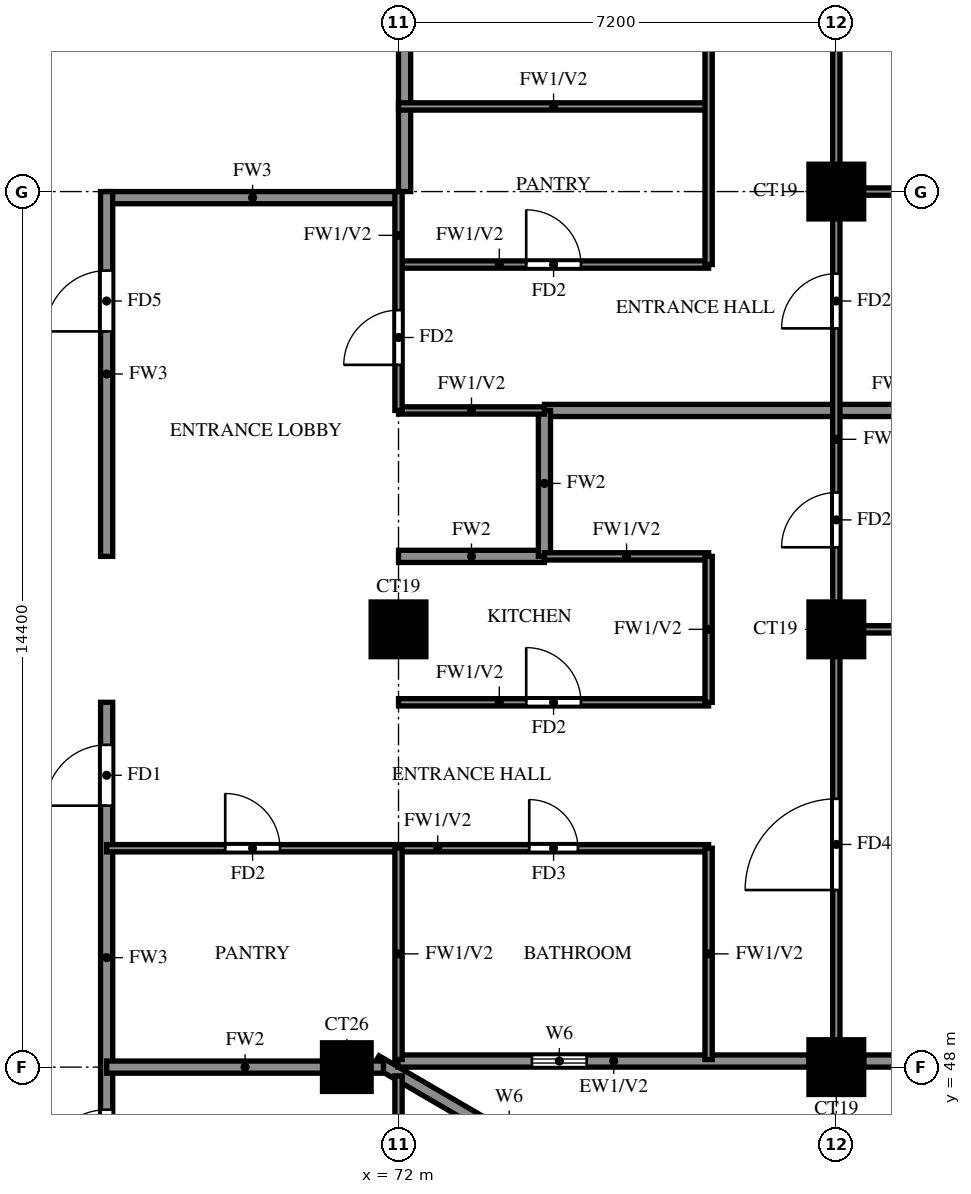
"""IFC4 building model, lengths in metres.
Left out: names, types, materials, properties, quantities, classifications, styles, units other than length and angle.
Written with IfcOpenShell. Run it as: python <this file> out.ifc"""

import sys

from ifc_helpers import new_model, si_unit, direction, frame, frame_2d, origin, origin_2d, place, context, subcontext, project, spatial, rectangle, extrude, source, transform, mapped, element, fill, save


model = new_model("IFC4")
c1 = context("Model", 3, precision=1e-05, world=origin(), true_north=direction((0.0, 1.0)))
c2 = subcontext(c1, "Body", "Model", "MODEL_VIEW")
j1 = project(units=[si_unit("LENGTHUNIT", "METRE"), si_unit("PLANEANGLEUNIT", "RADIAN")], contexts=[c1])
p1 = place(None, origin())
s1 = spatial("IfcSite", under=j1, at=p1, CompositionType="ELEMENT")
p2 = place(p1, origin())
s2 = spatial("IfcBuilding", under=s1, at=p2, CompositionType="ELEMENT")
p3 = place(p2, frame((0.0, 0.0, 174.5)))
s3 = spatial("IfcBuildingStorey", under=s2, at=p3, CompositionType="ELEMENT", Elevation=174.5)
m1 = source(origin(), c2, "Body", "SweptSolid", [
    extrude(rectangle(XDim=0.8, YDim=0.8, at=origin_2d()), origin(), (0.0, 0.0, 1.0), 3.2),
])
p4 = place(p3, frame((71.15, 48.0, 0.0), z_axis=(0.0, 0.0, 1.0), x_axis=(1.0, 0.0, 0.0)))
e1 = element("IfcColumn", 1, at=p4, inside=s3, PredefinedType="COLUMN", context=c2, shape_type="MappedRepresentation", body=[
    mapped(m1, transform((0.0, 0.0, 0.0))),
])
m2 = source(origin(), c2, "Body", "SweptSolid", [
    extrude(rectangle(XDim=0.9, YDim=0.9, at=origin_2d()), origin(), (0.0, 0.0, 1.0), 3.2),
])
for number, where, z_axis, x_axis in (
    (2, (79.2, 48.0, 0.0), (0.0, 0.0, 1.0), (1.0, 0.0, 0.0)),
    (3, (72.0, 55.2, 0.0), (0.0, 0.0, 1.0), (1.0, 0.0, 0.0)),
    (4, (79.2, 55.2, 0.0), (0.0, 0.0, 1.0), (1.0, 0.0, 0.0)),
    (5, (79.2, 62.4, 0.0), (0.0, 0.0, 1.0), (1.0, 0.0, 0.0)),
):
    element("IfcColumn", number, at=place(p3, frame(where, z_axis=z_axis, x_axis=x_axis)), inside=s3, PredefinedType="COLUMN", context=c2, shape_type="MappedRepresentation", body=[
        mapped(m2, transform((0.0, 0.0, 0.0))),
    ])
p5 = place(p3, frame((85.719, 39.881, 0.0), z_axis=(0.0, 0.0, 1.0), x_axis=(-0.86377618652, 0.503875678716, 0.0)))
e6 = element("IfcWall", 6, at=p5, inside=s3, PredefinedType="SOLIDWALL", context=c2, shape_type="SweptSolid", body=[
    extrude(rectangle(XDim=16.311, YDim=0.2, at=frame_2d((8.156, 0.0))), origin(), (0.0, 0.0, 1.0), 3.2),
])
p6 = place(p5, frame((13.326, 0.0, 1.5)))
e7 = element("IfcOpeningElement", 7, at=p6, cuts=e6, PredefinedType="OPENING", context=c2, shape_type="SweptSolid", body=[
    extrude(rectangle(XDim=0.9, YDim=0.9, at=frame_2d((0.45, 0.45))), frame((0.0, 0.11, 0.0), z_axis=(0.0, -1.0, 0.0), x_axis=(1.0, 0.0, 0.0)), (0.0, 0.0, 1.0), 0.22),
])
p7 = place(p3, frame((71.99, 48.1, 0.0), z_axis=(0.0, 0.0, 1.0), x_axis=(1.0, 0.0, 0.0)))
e8 = element("IfcWall", 8, at=p7, inside=s3, PredefinedType="SOLIDWALL", context=c2, shape_type="SweptSolid", body=[
    extrude(rectangle(XDim=6.76, YDim=0.2, at=frame_2d((3.38, 0.0))), origin(), (0.0, 0.0, 1.0), 3.2),
])
p8 = place(p7, frame((2.205, 0.0, 1.5)))
e9 = element("IfcOpeningElement", 9, at=p8, cuts=e8, PredefinedType="OPENING", context=c2, shape_type="SweptSolid", body=[
    extrude(rectangle(XDim=0.9, YDim=0.9, at=frame_2d((0.45, 0.45))), frame((0.0, 0.11, 0.0), z_axis=(0.0, -1.0, 0.0), x_axis=(1.0, 0.0, 0.0)), (0.0, 0.0, 1.0), 0.22),
])
p9 = place(p3, frame((79.65, 48.1, 0.0), z_axis=(0.0, 0.0, 1.0), x_axis=(1.0, 0.0, 0.0)))
e10 = element("IfcWall", 10, at=p9, inside=s3, PredefinedType="SOLIDWALL", context=c2, shape_type="SweptSolid", body=[
    extrude(rectangle(XDim=5.75, YDim=0.2, at=frame_2d((2.875, 0.0))), origin(), (0.0, 0.0, 1.0), 3.2),
])
p10 = place(p9, frame((1.675, 0.0, 0.6)))
e11 = element("IfcOpeningElement", 11, at=p10, cuts=e10, PredefinedType="OPENING", context=c2, shape_type="SweptSolid", body=[
    extrude(rectangle(XDim=2.4, YDim=2.4, at=frame_2d((1.2, 1.2))), frame((0.0, 0.11, 0.0), z_axis=(0.0, -1.0, 0.0), x_axis=(1.0, 0.0, 0.0)), (0.0, 0.0, 1.0), 0.22),
])
p11 = place(p3, frame((67.2, 62.3, 0.0), z_axis=(0.0, 0.0, 1.0), x_axis=(1.0, 0.0, 0.0)))
e12 = element("IfcWall", 12, at=p11, inside=s3, PredefinedType="SOLIDWALL", context=c2, shape_type="SweptSolid", body=[
    extrude(rectangle(XDim=4.8, YDim=0.2, at=frame_2d((2.4, 0.0))), origin(), (0.0, 0.0, 1.0), 3.2),
])
p12 = place(p3, frame((67.2, 45.6, 0.0), z_axis=(0.0, 0.0, 1.0), x_axis=(0.0, 1.0, 0.0)))
e13 = element("IfcWall", 13, at=p12, inside=s3, PredefinedType="SOLIDWALL", context=c2, shape_type="SweptSolid", body=[
    extrude(rectangle(XDim=8.4, YDim=0.2, at=frame_2d((4.2, 0.0))), origin(), (0.0, 0.0, 1.0), 3.2),
])
p13 = place(p12, frame((6.7, 0.0, 0.0)))
e14 = element("IfcOpeningElement", 14, at=p13, cuts=e13, PredefinedType="OPENING", context=c2, shape_type="SweptSolid", body=[
    extrude(rectangle(XDim=1.0, YDim=2.1, at=frame_2d((0.5, 1.05))), frame((0.0, 0.11, 0.0), z_axis=(0.0, -1.0, 0.0), x_axis=(1.0, 0.0, 0.0)), (0.0, 0.0, 1.0), 0.22),
])
p14 = place(p12, frame((0.7, 0.0, 0.0)))
e15 = element("IfcOpeningElement", 15, at=p14, cuts=e13, PredefinedType="OPENING", context=c2, shape_type="SweptSolid", body=[
    extrude(rectangle(XDim=1.0, YDim=2.1, at=frame_2d((0.5, 1.05))), frame((0.0, 0.11, 0.0), z_axis=(0.0, -1.0, 0.0), x_axis=(1.0, 0.0, 0.0)), (0.0, 0.0, 1.0), 0.22),
])
p15 = place(p3, frame((67.2, 56.4, 0.0), z_axis=(0.0, 0.0, 1.0), x_axis=(0.0, 1.0, 0.0)))
e16 = element("IfcWall", 16, at=p15, inside=s3, PredefinedType="SOLIDWALL", context=c2, shape_type="SweptSolid", body=[
    extrude(rectangle(XDim=6.0, YDim=0.2, at=frame_2d((3.0, 0.0))), origin(), (0.0, 0.0, 1.0), 3.2),
])
p16 = place(p15, frame((3.7, 0.0, 0.0)))
e17 = element("IfcOpeningElement", 17, at=p16, cuts=e16, PredefinedType="OPENING", context=c2, shape_type="SweptSolid", body=[
    extrude(rectangle(XDim=1.0, YDim=2.1, at=frame_2d((0.5, 1.05))), frame((0.0, 0.11, 0.0), z_axis=(0.0, -1.0, 0.0), x_axis=(1.0, 0.0, 0.0)), (0.0, 0.0, 1.0), 0.22),
])
p17 = place(p3, frame((72.1, 62.4, 0.0), z_axis=(0.0, 0.0, 1.0), x_axis=(0.0, 1.0, 0.0)))
e18 = element("IfcWall", 18, at=p17, inside=s3, PredefinedType="SOLIDWALL", context=c2, shape_type="SweptSolid", body=[
    extrude(rectangle(XDim=15.6, YDim=0.2, at=frame_2d((7.8, 0.0))), origin(), (0.0, 0.0, 1.0), 3.2),
])
p18 = place(p3, frame((67.2, 48.0, 0.0), z_axis=(0.0, 0.0, 1.0), x_axis=(1.0, 0.0, 0.0)))
e19 = element("IfcWall", 19, at=p18, inside=s3, PredefinedType="SOLIDWALL", context=c2, shape_type="SweptSolid", body=[
    extrude(rectangle(XDim=4.552, YDim=0.2, at=frame_2d((2.276, 0.0))), origin(), (0.0, 0.0, 1.0), 3.2),
])
p19 = place(p3, frame((72.0, 56.4, 0.0), z_axis=(0.0, 0.0, 1.0), x_axis=(1.0, 0.0, 0.0)))
e20 = element("IfcWall", 20, at=p19, inside=s3, PredefinedType="SOLIDWALL", context=c2, shape_type="SweptSolid", body=[
    extrude(rectangle(XDim=2.4, YDim=0.2, at=frame_2d((1.2, 0.0))), origin(), (0.0, 0.0, 1.0), 3.2),
])
p20 = place(p3, frame((74.4, 58.8, 0.0), z_axis=(0.0, 0.0, 1.0), x_axis=(1.0, 0.0, 0.0)))
e21 = element("IfcWall", 21, at=p20, inside=s3, PredefinedType="SOLIDWALL", context=c2, shape_type="SweptSolid", body=[
    extrude(rectangle(XDim=11.875, YDim=0.2, at=frame_2d((5.938, 0.0))), origin(), (0.0, 0.0, 1.0), 2.3),
])
p21 = place(p3, frame((74.4, 56.4, 0.0), z_axis=(0.0, 0.0, 1.0), x_axis=(0.0, 1.0, 0.0)))
e22 = element("IfcWall", 22, at=p21, inside=s3, PredefinedType="SOLIDWALL", context=c2, shape_type="SweptSolid", body=[
    extrude(rectangle(XDim=2.4, YDim=0.2, at=frame_2d((1.2, 0.0))), origin(), (0.0, 0.0, 1.0), 3.2),
])
p22 = place(p3, frame((67.2, 51.6, 0.0), z_axis=(0.0, 0.0, 1.0), x_axis=(1.0, 0.0, 0.0)))
e23 = element("IfcWall", 23, at=p22, inside=s3, PredefinedType="PARTITIONING", context=c2, shape_type="SweptSolid", body=[
    extrude(rectangle(XDim=9.9, YDim=0.12, at=frame_2d((4.95, 0.0))), origin(), (0.0, 0.0, 1.0), 3.2),
])
p23 = place(p22, frame((6.95, 0.0, 0.0)))
e24 = element("IfcOpeningElement", 24, at=p23, cuts=e23, PredefinedType="OPENING", context=c2, shape_type="SweptSolid", body=[
    extrude(rectangle(XDim=0.8, YDim=2.1, at=frame_2d((0.4, 1.05))), frame((0.0, 0.07, 0.0), z_axis=(0.0, -1.0, 0.0), x_axis=(1.0, 0.0, 0.0)), (0.0, 0.0, 1.0), 0.14),
])
p24 = place(p22, frame((1.95, 0.0, 0.0)))
e25 = element("IfcOpeningElement", 25, at=p24, cuts=e23, PredefinedType="OPENING", context=c2, shape_type="SweptSolid", body=[
    extrude(rectangle(XDim=0.9, YDim=2.1, at=frame_2d((0.45, 1.05))), frame((0.0, 0.07, 0.0), z_axis=(0.0, -1.0, 0.0), x_axis=(1.0, 0.0, 0.0)), (0.0, 0.0, 1.0), 0.14),
])
p25 = place(p3, frame((72.0, 54.0, 0.0), z_axis=(0.0, 0.0, 1.0), x_axis=(1.0, 0.0, 0.0)))
e26 = element("IfcWall", 26, at=p25, inside=s3, PredefinedType="PARTITIONING", context=c2, shape_type="SweptSolid", body=[
    extrude(rectangle(XDim=5.1, YDim=0.12, at=frame_2d((2.55, 0.0))), origin(), (0.0, 0.0, 1.0), 3.2),
])
p26 = place(p25, frame((2.1, 0.0, 0.0)))
e27 = element("IfcOpeningElement", 27, at=p26, cuts=e26, PredefinedType="OPENING", context=c2, shape_type="SweptSolid", body=[
    extrude(rectangle(XDim=0.9, YDim=2.1, at=frame_2d((0.45, 1.05))), frame((0.0, 0.07, 0.0), z_axis=(0.0, -1.0, 0.0), x_axis=(1.0, 0.0, 0.0)), (0.0, 0.0, 1.0), 0.14),
])
p27 = place(p3, frame((79.2, 55.2, 0.0), z_axis=(0.0, 0.0, 1.0), x_axis=(1.0, 0.0, 0.0)))
e28 = element("IfcWall", 28, at=p27, inside=s3, PredefinedType="PARTITIONING", context=c2, shape_type="SweptSolid", body=[
    extrude(rectangle(XDim=7.075, YDim=0.12, at=frame_2d((3.538, 0.0))), origin(), (0.0, 0.0, 1.0), 3.2),
])
p28 = place(p3, frame((74.4, 56.4, 0.0), z_axis=(0.0, 0.0, 1.0), x_axis=(1.0, 0.0, 0.0)))
e29 = element("IfcWall", 29, at=p28, inside=s3, PredefinedType="PARTITIONING", context=c2, shape_type="SweptSolid", body=[
    extrude(rectangle(XDim=2.7, YDim=0.12, at=frame_2d((1.35, 0.0))), origin(), (0.0, 0.0, 1.0), 3.2),
])
p29 = place(p3, frame((72.0, 58.8, 0.0), z_axis=(0.0, 0.0, 1.0), x_axis=(1.0, 0.0, 0.0)))
e30 = element("IfcWall", 30, at=p29, inside=s3, PredefinedType="PARTITIONING", context=c2, shape_type="SweptSolid", body=[
    extrude(rectangle(XDim=2.4, YDim=0.12, at=frame_2d((1.2, 0.0))), origin(), (0.0, 0.0, 1.0), 3.2),
])
p30 = place(p3, frame((72.0, 61.2, 0.0), z_axis=(0.0, 0.0, 1.0), x_axis=(1.0, 0.0, 0.0)))
e31 = element("IfcWall", 31, at=p30, inside=s3, PredefinedType="PARTITIONING", context=c2, shape_type="SweptSolid", body=[
    extrude(rectangle(XDim=5.1, YDim=0.12, at=frame_2d((2.55, 0.0))), origin(), (0.0, 0.0, 1.0), 3.2),
])
p31 = place(p30, frame((2.1, 0.0, 0.0)))
e32 = element("IfcOpeningElement", 32, at=p31, cuts=e31, PredefinedType="OPENING", context=c2, shape_type="SweptSolid", body=[
    extrude(rectangle(XDim=0.9, YDim=2.1, at=frame_2d((0.45, 1.05))), frame((0.0, 0.07, 0.0), z_axis=(0.0, -1.0, 0.0), x_axis=(1.0, 0.0, 0.0)), (0.0, 0.0, 1.0), 0.14),
])
p32 = place(p3, frame((79.2, 62.4, 0.0), z_axis=(0.0, 0.0, 1.0), x_axis=(1.0, 0.0, 0.0)))
e33 = element("IfcWall", 33, at=p32, inside=s3, PredefinedType="PARTITIONING", context=c2, shape_type="SweptSolid", body=[
    extrude(rectangle(XDim=7.075, YDim=0.12, at=frame_2d((3.538, 0.0))), origin(), (0.0, 0.0, 1.0), 3.2),
])
p33 = place(p3, frame((72.0, 63.8, 0.0), z_axis=(0.0, 0.0, 1.0), x_axis=(1.0, 0.0, 0.0)))
e34 = element("IfcWall", 34, at=p33, inside=s3, PredefinedType="PARTITIONING", context=c2, shape_type="SweptSolid", body=[
    extrude(rectangle(XDim=5.1, YDim=0.12, at=frame_2d((2.55, 0.0))), origin(), (0.0, 0.0, 1.0), 3.2),
])
p34 = place(p3, frame((72.0, 39.725, 0.0), z_axis=(0.0, 0.0, 1.0), x_axis=(0.0, 1.0, 0.0)))
e35 = element("IfcWall", 35, at=p34, inside=s3, PredefinedType="PARTITIONING", context=c2, shape_type="SweptSolid", body=[
    extrude(rectangle(XDim=8.13, YDim=0.12, at=frame_2d((4.065, 0.0))), origin(), (0.0, 0.0, 1.0), 2.3),
])
p35 = place(p34, frame((1.788, 0.0, 0.0)))
e36 = element("IfcOpeningElement", 36, at=p35, cuts=e35, PredefinedType="OPENING", context=c2, shape_type="SweptSolid", body=[
    extrude(rectangle(XDim=0.9, YDim=2.1, at=frame_2d((0.45, 1.05))), frame((0.0, 0.07, 0.0), z_axis=(0.0, -1.0, 0.0), x_axis=(1.0, 0.0, 0.0)), (0.0, 0.0, 1.0), 0.14),
])
p36 = place(p34, frame((4.575, 0.0, 0.0)))
e37 = element("IfcOpeningElement", 37, at=p36, cuts=e35, PredefinedType="OPENING", context=c2, shape_type="SweptSolid", body=[
    extrude(rectangle(XDim=0.8, YDim=2.1, at=frame_2d((0.4, 1.05))), frame((0.0, 0.07, 0.0), z_axis=(0.0, -1.0, 0.0), x_axis=(1.0, 0.0, 0.0)), (0.0, 0.0, 1.0), 0.14),
])
p37 = place(p3, frame((72.0, 48.125, 0.0), z_axis=(0.0, 0.0, 1.0), x_axis=(0.0, 1.0, 0.0)))
e38 = element("IfcWall", 38, at=p37, inside=s3, PredefinedType="PARTITIONING", context=c2, shape_type="SweptSolid", body=[
    extrude(rectangle(XDim=3.475, YDim=0.12, at=frame_2d((1.738, 0.0))), origin(), (0.0, 0.0, 1.0), 3.2),
])
p38 = place(p3, frame((72.0, 58.8, 0.0), z_axis=(0.0, 0.0, 1.0), x_axis=(0.0, 1.0, 0.0)))
e39 = element("IfcWall", 39, at=p38, inside=s3, PredefinedType="PARTITIONING", context=c2, shape_type="SweptSolid", body=[
    extrude(rectangle(XDim=3.6, YDim=0.12, at=frame_2d((1.8, 0.0))), origin(), (0.0, 0.0, 1.0), 3.2),
])
p39 = place(p38, frame((0.75, 0.0, 0.0)))
e40 = element("IfcOpeningElement", 40, at=p39, cuts=e39, PredefinedType="OPENING", context=c2, shape_type="SweptSolid", body=[
    extrude(rectangle(XDim=0.9, YDim=2.1, at=frame_2d((0.45, 1.05))), frame((0.0, 0.07, 0.0), z_axis=(0.0, -1.0, 0.0), x_axis=(1.0, 0.0, 0.0)), (0.0, 0.0, 1.0), 0.14),
])
p40 = place(p3, frame((77.1, 48.125, 0.0), z_axis=(0.0, 0.0, 1.0), x_axis=(0.0, 1.0, 0.0)))
e41 = element("IfcWall", 41, at=p40, inside=s3, PredefinedType="PARTITIONING", context=c2, shape_type="SweptSolid", body=[
    extrude(rectangle(XDim=3.475, YDim=0.12, at=frame_2d((1.738, 0.0))), origin(), (0.0, 0.0, 1.0), 3.2),
])
p41 = place(p3, frame((77.1, 54.0, 0.0), z_axis=(0.0, 0.0, 1.0), x_axis=(0.0, 1.0, 0.0)))
e42 = element("IfcWall", 42, at=p41, inside=s3, PredefinedType="PARTITIONING", context=c2, shape_type="SweptSolid", body=[
    extrude(rectangle(XDim=2.4, YDim=0.12, at=frame_2d((1.2, 0.0))), origin(), (0.0, 0.0, 1.0), 3.2),
])
p42 = place(p3, frame((77.1, 61.2, 0.0), z_axis=(0.0, 0.0, 1.0), x_axis=(0.0, 1.0, 0.0)))
e43 = element("IfcWall", 43, at=p42, inside=s3, PredefinedType="PARTITIONING", context=c2, shape_type="SweptSolid", body=[
    extrude(rectangle(XDim=12.0, YDim=0.12, at=frame_2d((6.0, 0.0))), origin(), (0.0, 0.0, 1.0), 3.2),
])
p43 = place(p42, frame((4.55, 0.0, 0.0)))
e44 = element("IfcOpeningElement", 44, at=p43, cuts=e43, PredefinedType="OPENING", context=c2, shape_type="SweptSolid", body=[
    extrude(rectangle(XDim=0.9, YDim=2.1, at=frame_2d((0.45, 1.05))), frame((0.0, 0.07, 0.0), z_axis=(0.0, -1.0, 0.0), x_axis=(1.0, 0.0, 0.0)), (0.0, 0.0, 1.0), 0.14),
])
p44 = place(p42, frame((9.3, 0.0, 0.0)))
e45 = element("IfcOpeningElement", 45, at=p44, cuts=e43, PredefinedType="OPENING", context=c2, shape_type="SweptSolid", body=[
    extrude(rectangle(XDim=0.8, YDim=2.1, at=frame_2d((0.4, 1.05))), frame((0.0, 0.07, 0.0), z_axis=(0.0, -1.0, 0.0), x_axis=(1.0, 0.0, 0.0)), (0.0, 0.0, 1.0), 0.14),
])
p45 = place(p3, frame((79.2, 48.125, 0.0), z_axis=(0.0, 0.0, 1.0), x_axis=(0.0, 1.0, 0.0)))
e46 = element("IfcWall", 46, at=p45, inside=s3, PredefinedType="PARTITIONING", context=c2, shape_type="SweptSolid", body=[
    extrude(rectangle(XDim=21.475, YDim=0.12, at=frame_2d((10.738, 0.0))), origin(), (0.0, 0.0, 1.0), 3.2),
])
p46 = place(p45, frame((2.788, 0.0, 0.0)))
e47 = element("IfcOpeningElement", 47, at=p46, cuts=e46, PredefinedType="OPENING", context=c2, shape_type="SweptSolid", body=[
    extrude(rectangle(XDim=1.5, YDim=2.1, at=frame_2d((0.75, 1.05))), frame((0.0, 0.07, 0.0), z_axis=(0.0, -1.0, 0.0), x_axis=(1.0, 0.0, 0.0)), (0.0, 0.0, 1.0), 0.14),
])
p47 = place(p45, frame((8.425, 0.0, 0.0)))
e48 = element("IfcOpeningElement", 48, at=p47, cuts=e46, PredefinedType="OPENING", context=c2, shape_type="SweptSolid", body=[
    extrude(rectangle(XDim=0.9, YDim=2.1, at=frame_2d((0.45, 1.05))), frame((0.0, 0.07, 0.0), z_axis=(0.0, -1.0, 0.0), x_axis=(1.0, 0.0, 0.0)), (0.0, 0.0, 1.0), 0.14),
])
p48 = place(p45, frame((12.025, 0.0, 0.0)))
e49 = element("IfcOpeningElement", 49, at=p48, cuts=e46, PredefinedType="OPENING", context=c2, shape_type="SweptSolid", body=[
    extrude(rectangle(XDim=0.9, YDim=2.1, at=frame_2d((0.45, 1.05))), frame((0.0, 0.07, 0.0), z_axis=(0.0, -1.0, 0.0), x_axis=(1.0, 0.0, 0.0)), (0.0, 0.0, 1.0), 0.14),
])
p49 = place(p45, frame((17.425, 0.0, 0.0)))
e50 = element("IfcOpeningElement", 50, at=p49, cuts=e46, PredefinedType="OPENING", context=c2, shape_type="SweptSolid", body=[
    extrude(rectangle(XDim=0.9, YDim=2.1, at=frame_2d((0.45, 1.05))), frame((0.0, 0.07, 0.0), z_axis=(0.0, -1.0, 0.0), x_axis=(1.0, 0.0, 0.0)), (0.0, 0.0, 1.0), 0.14),
])
p50 = place(p8, origin())
e51 = element("IfcWindow", 51, at=p50, inside=s3, PartitioningType="SINGLE_PANEL", PredefinedType="WINDOW", context=c2, shape_type="SweptSolid", body=[
    extrude(rectangle(XDim=0.9, YDim=0.9, at=frame_2d((0.45, 0.45))), frame((0.0, 0.03, 0.0), z_axis=(0.0, -1.0, 0.0), x_axis=(1.0, 0.0, 0.0)), (0.0, 0.0, 1.0), 0.06),
])
fill(e9, e51)
p51 = place(p13, origin())
e52 = element("IfcDoor", 52, at=p51, inside=s3, OperationType="SINGLE_SWING_LEFT", PredefinedType="DOOR", context=c2, shape_type="SweptSolid", body=[
    extrude(rectangle(XDim=1.0, YDim=2.1, at=frame_2d((0.5, 1.05))), frame((0.0, 0.025, 0.0), z_axis=(0.0, -1.0, 0.0), x_axis=(1.0, 0.0, 0.0)), (0.0, 0.0, 1.0), 0.05),
])
fill(e14, e52)
p52 = place(p46, origin())
e53 = element("IfcDoor", 53, at=p52, inside=s3, OperationType="SINGLE_SWING_RIGHT", PredefinedType="DOOR", context=c2, shape_type="SweptSolid", body=[
    extrude(rectangle(XDim=1.5, YDim=2.1, at=frame_2d((0.75, 1.05))), frame((0.0, 0.025, 0.0), z_axis=(0.0, -1.0, 0.0), x_axis=(1.0, 0.0, 0.0)), (0.0, 0.0, 1.0), 0.05),
])
fill(e47, e53)
p53 = place(p47, origin())
e54 = element("IfcDoor", 54, at=p53, inside=s3, OperationType="SINGLE_SWING_LEFT", PredefinedType="DOOR", context=c2, shape_type="SweptSolid", body=[
    extrude(rectangle(XDim=0.9, YDim=2.1, at=frame_2d((0.45, 1.05))), frame((0.0, 0.025, 0.0), z_axis=(0.0, -1.0, 0.0), x_axis=(1.0, 0.0, 0.0)), (0.0, 0.0, 1.0), 0.05),
])
fill(e48, e54)
p54 = place(p23, origin())
e55 = element("IfcDoor", 55, at=p54, inside=s3, OperationType="SINGLE_SWING_LEFT", PredefinedType="DOOR", context=c2, shape_type="SweptSolid", body=[
    extrude(rectangle(XDim=0.8, YDim=2.1, at=frame_2d((0.4, 1.05))), frame((0.0, 0.025, 0.0), z_axis=(0.0, -1.0, 0.0), x_axis=(1.0, 0.0, 0.0)), (0.0, 0.0, 1.0), 0.05),
])
fill(e24, e55)
p55 = place(p26, origin())
e56 = element("IfcDoor", 56, at=p55, inside=s3, OperationType="SINGLE_SWING_RIGHT", PredefinedType="DOOR", context=c2, shape_type="SweptSolid", body=[
    extrude(rectangle(XDim=0.9, YDim=2.1, at=frame_2d((0.45, 1.05))), frame((0.0, 0.025, 0.0), z_axis=(0.0, -1.0, 0.0), x_axis=(1.0, 0.0, 0.0)), (0.0, 0.0, 1.0), 0.05),
])
fill(e27, e56)
p56 = place(p24, origin())
e57 = element("IfcDoor", 57, at=p56, inside=s3, OperationType="SINGLE_SWING_LEFT", PredefinedType="DOOR", context=c2, shape_type="SweptSolid", body=[
    extrude(rectangle(XDim=0.9, YDim=2.1, at=frame_2d((0.45, 1.05))), frame((0.0, 0.025, 0.0), z_axis=(0.0, -1.0, 0.0), x_axis=(1.0, 0.0, 0.0)), (0.0, 0.0, 1.0), 0.05),
])
fill(e25, e57)
p57 = place(p39, origin())
e58 = element("IfcDoor", 58, at=p57, inside=s3, OperationType="SINGLE_SWING_RIGHT", PredefinedType="DOOR", context=c2, shape_type="SweptSolid", body=[
    extrude(rectangle(XDim=0.9, YDim=2.1, at=frame_2d((0.45, 1.05))), frame((0.0, 0.025, 0.0), z_axis=(0.0, -1.0, 0.0), x_axis=(1.0, 0.0, 0.0)), (0.0, 0.0, 1.0), 0.05),
])
fill(e40, e58)
p58 = place(p16, origin())
e59 = element("IfcDoor", 59, at=p58, inside=s3, OperationType="SINGLE_SWING_LEFT", PredefinedType="DOOR", context=c2, shape_type="SweptSolid", body=[
    extrude(rectangle(XDim=1.0, YDim=2.1, at=frame_2d((0.5, 1.05))), frame((0.0, 0.025, 0.0), z_axis=(0.0, -1.0, 0.0), x_axis=(1.0, 0.0, 0.0)), (0.0, 0.0, 1.0), 0.05),
])
fill(e17, e59)
p59 = place(p48, origin())
e60 = element("IfcDoor", 60, at=p59, inside=s3, OperationType="SINGLE_SWING_LEFT", PredefinedType="DOOR", context=c2, shape_type="SweptSolid", body=[
    extrude(rectangle(XDim=0.9, YDim=2.1, at=frame_2d((0.45, 1.05))), frame((0.0, 0.025, 0.0), z_axis=(0.0, -1.0, 0.0), x_axis=(1.0, 0.0, 0.0)), (0.0, 0.0, 1.0), 0.05),
])
fill(e49, e60)
p60 = place(p31, origin())
e61 = element("IfcDoor", 61, at=p60, inside=s3, OperationType="SINGLE_SWING_RIGHT", PredefinedType="DOOR", context=c2, shape_type="SweptSolid", body=[
    extrude(rectangle(XDim=0.9, YDim=2.1, at=frame_2d((0.45, 1.05))), frame((0.0, 0.025, 0.0), z_axis=(0.0, -1.0, 0.0), x_axis=(1.0, 0.0, 0.0)), (0.0, 0.0, 1.0), 0.05),
])
fill(e32, e61)
p61 = place(p14, origin())
e62 = element("IfcDoor", 62, at=p61, inside=s3, OperationType="SINGLE_SWING_LEFT", PredefinedType="DOOR", context=c2, shape_type="SweptSolid", body=[
    extrude(rectangle(XDim=1.0, YDim=2.1, at=frame_2d((0.5, 1.05))), frame((0.0, 0.025, 0.0), z_axis=(0.0, -1.0, 0.0), x_axis=(1.0, 0.0, 0.0)), (0.0, 0.0, 1.0), 0.05),
])
fill(e15, e62)
save(model, sys.argv[1])
